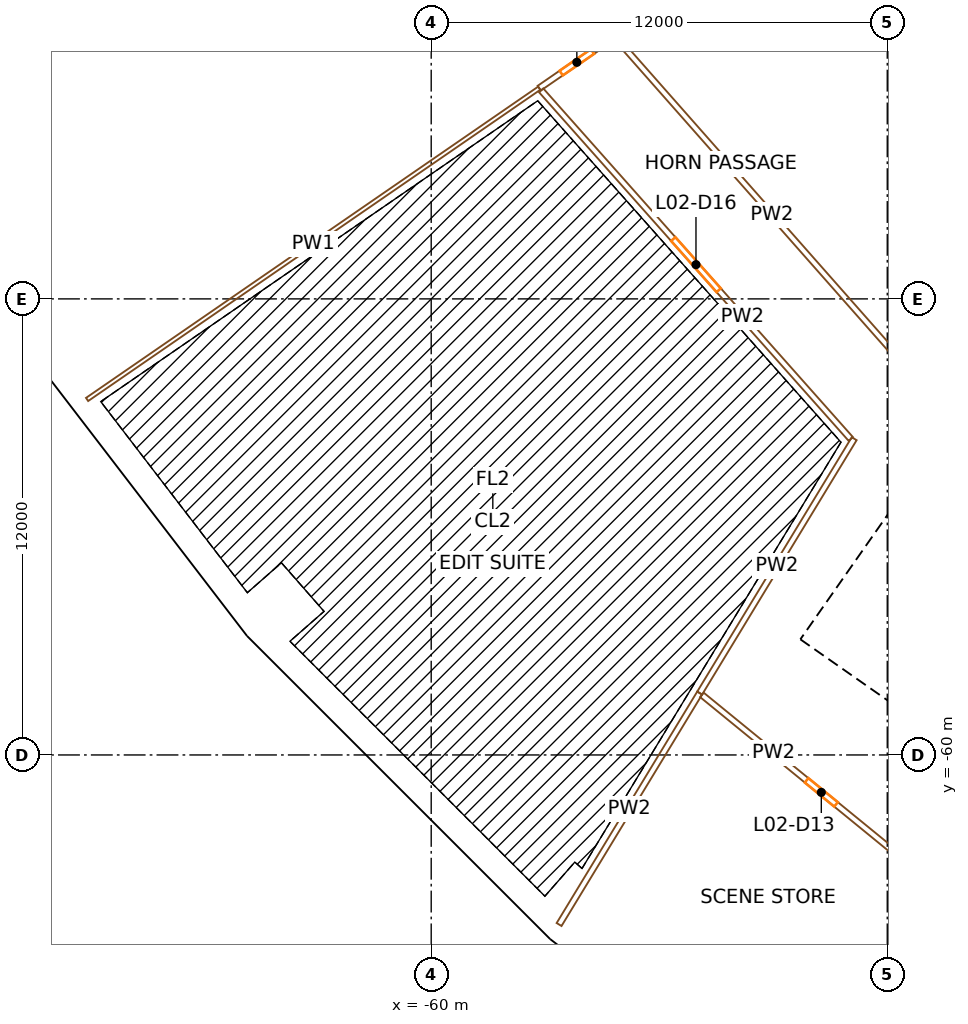
"""IFC4 building model, lengths in metres.
Left out: names, types, materials, properties, quantities, classifications, styles, units other than length and angle.
Written with IfcOpenShell. Run it as: python <this file> out.ifc"""

import sys

from ifc_helpers import new_model, si_unit, direction, frame, frame_2d, origin, origin_2d, place, context, subcontext, project, spatial, rectangle, extrude, element, fill, save


model = new_model("IFC4")
c1 = context("Model", 3, precision=1e-05, world=origin(), true_north=direction((0.0, 1.0)))
c2 = subcontext(c1, "Body", "Model", "MODEL_VIEW")
j1 = project(units=[si_unit("LENGTHUNIT", "METRE"), si_unit("PLANEANGLEUNIT", "RADIAN")], contexts=[c1])
p1 = place(None, origin())
s1 = spatial("IfcSite", under=j1, at=p1, CompositionType="ELEMENT")
p2 = place(p1, origin())
s2 = spatial("IfcBuilding", under=s1, at=p2, CompositionType="ELEMENT")
p3 = place(p2, frame((0.0, 0.0, 18.0)))
s3 = spatial("IfcBuildingStorey", under=s2, at=p3, CompositionType="ELEMENT", Elevation=18.0)
for number, where, z_axis, x_axis in (
    (1, (-64.647, -43.196, 0.0), (0.0, 0.0, 1.0), (0.556, -0.831, 0.0)),
    (2, (-58.456, -51.264, 0.0), (0.0, 0.0, 1.0), (0.659, -0.752, 0.0)),
):
    element("IfcColumn", number, at=place(p3, frame(where, z_axis=z_axis, x_axis=x_axis)), inside=s3, PredefinedType="COLUMN", context=c2, shape_type="SweptSolid", body=[
        extrude(rectangle(XDim=1.4, YDim=1.8, at=origin_2d()), origin(), (0.0, 0.0, 1.0), 9.0),
    ])
p4 = place(p3, frame((-64.094, -56.209, 0.0), z_axis=(0.0, 0.0, 1.0), x_axis=(0.6593458151, -0.751839807479, 0.0)))
e3 = element("IfcColumn", 3, at=p4, inside=s3, PredefinedType="COLUMN", context=c2, shape_type="SweptSolid", body=[
    extrude(rectangle(XDim=1.1, YDim=1.3, at=origin_2d()), origin(), (0.0, 0.0, 1.0), 9.0),
])
p5 = place(p3, frame((-51.264, -58.456, 0.0), z_axis=(0.0, 0.0, 1.0), x_axis=(0.751839807479, -0.6593458151, 0.0)))
e4 = element("IfcColumn", 4, at=p5, inside=s3, PredefinedType="COLUMN", context=c2, shape_type="SweptSolid", body=[
    extrude(rectangle(XDim=1.4, YDim=1.8, at=origin_2d()), origin(), (0.0, 0.0, 1.0), 9.0),
])
p6 = place(p3, frame((-56.209, -64.094, 0.0), z_axis=(0.0, 0.0, 1.0), x_axis=(0.751839807479, -0.6593458151, 0.0)))
e5 = element("IfcColumn", 5, at=p6, inside=s3, PredefinedType="COLUMN", context=c2, shape_type="SweptSolid", body=[
    extrude(rectangle(XDim=1.1, YDim=1.3, at=origin_2d()), origin(), (0.0, 0.0, 1.0), 9.0),
])
p7 = place(p3, frame((-49.779, -57.191, 0.0), z_axis=(0.0, 0.0, 1.0), x_axis=(0.573577477574, 0.819151315216, 0.0)))
e6 = element("IfcWall", 6, at=p7, inside=s3, PredefinedType="SHEAR", context=c2, shape_type="SweptSolid", body=[
    extrude(rectangle(XDim=14.8, YDim=0.9, at=frame_2d((7.4, 0.0))), origin(), (0.0, 0.0, 1.0), 8.6),
])
p8 = place(p7, frame((6.7, 0.0, 0.0)))
e7 = element("IfcOpeningElement", 7, at=p8, cuts=e6, PredefinedType="OPENING", context=c2, shape_type="SweptSolid", body=[
    extrude(rectangle(XDim=1.4, YDim=2.1, at=frame_2d((0.7, 1.05))), frame((0.0, 0.46, 0.0), z_axis=(0.0, -1.0, 0.0), x_axis=(1.0, 0.0, 0.0)), (0.0, 0.0, 1.0), 0.92),
])
p9 = place(p3, frame((-36.827, -65.71, 0.0), z_axis=(0.0, 0.0, 1.0), x_axis=(-0.819153391756, 0.573574511963, 0.0)))
e8 = element("IfcWall", 8, at=p9, inside=s3, PredefinedType="SHEAR", context=c2, shape_type="SweptSolid", body=[
    extrude(rectangle(XDim=15.045, YDim=0.9, at=frame_2d((7.523, 0.0))), origin(), (0.0, 0.0, 1.0), 8.6),
])
p10 = place(p9, frame((1.05, 0.0, 0.0)))
e9 = element("IfcOpeningElement", 9, at=p10, cuts=e8, PredefinedType="OPENING", context=c2, shape_type="SweptSolid", body=[
    extrude(rectangle(XDim=1.0, YDim=2.1, at=frame_2d((0.5, 1.05))), frame((0.0, 0.46, 0.0), z_axis=(0.0, -1.0, 0.0), x_axis=(1.0, 0.0, 0.0)), (0.0, 0.0, 1.0), 0.92),
])
p11 = place(p9, frame((3.625, 0.0, 0.0)))
e10 = element("IfcOpeningElement", 10, at=p11, cuts=e8, PredefinedType="OPENING", context=c2, shape_type="SweptSolid", body=[
    extrude(rectangle(XDim=1.0, YDim=2.1, at=frame_2d((0.5, 1.05))), frame((0.0, 0.46, 0.0), z_axis=(0.0, -1.0, 0.0), x_axis=(1.0, 0.0, 0.0)), (0.0, 0.0, 1.0), 0.92),
])
p12 = place(p9, frame((6.075, 0.0, 0.0)))
e11 = element("IfcOpeningElement", 11, at=p12, cuts=e8, PredefinedType="OPENING", context=c2, shape_type="SweptSolid", body=[
    extrude(rectangle(XDim=1.0, YDim=2.1, at=frame_2d((0.5, 1.05))), frame((0.0, 0.46, 0.0), z_axis=(0.0, -1.0, 0.0), x_axis=(1.0, 0.0, 0.0)), (0.0, 0.0, 1.0), 0.92),
])
p13 = place(p9, frame((13.495, 0.0, 0.0)))
e12 = element("IfcOpeningElement", 12, at=p13, cuts=e8, PredefinedType="OPENING", context=c2, shape_type="SweptSolid", body=[
    extrude(rectangle(XDim=1.1, YDim=2.1, at=frame_2d((0.55, 1.05))), frame((0.0, 0.46, 0.0), z_axis=(0.0, -1.0, 0.0), x_axis=(1.0, 0.0, 0.0)), (0.0, 0.0, 1.0), 0.92),
])
p14 = place(p3, frame((-71.491, -47.839, 0.0), z_axis=(0.0, 0.0, 1.0), x_axis=(0.608758773695, -0.793355377778, 0.0)))
e13 = element("IfcWall", 13, at=p14, inside=s3, PredefinedType="SOLIDWALL", context=c2, shape_type="SweptSolid", body=[
    extrude(rectangle(XDim=11.135, YDim=0.45, at=frame_2d((5.567, 0.0))), origin(), (0.0, 0.0, 1.0), 7.7),
])
p15 = place(p3, frame((-64.698, -56.699, 0.0), z_axis=(0.0, 0.0, 1.0), x_axis=(0.707106781187, -0.707106781187, 0.0)))
e14 = element("IfcWall", 14, at=p15, inside=s3, PredefinedType="SOLIDWALL", context=c2, shape_type="SweptSolid", body=[
    extrude(rectangle(XDim=11.312, YDim=0.45, at=frame_2d((5.656, 0.0))), origin(), (0.0, 0.0, 1.0), 7.7),
])
p16 = place(p3, frame((-56.673, -64.713, 0.0), z_axis=(0.0, 0.0, 1.0), x_axis=(0.793355377778, -0.608758773695, 0.0)))
e15 = element("IfcWall", 15, at=p16, inside=s3, PredefinedType="SOLIDWALL", context=c2, shape_type="SweptSolid", body=[
    extrude(rectangle(XDim=11.135, YDim=0.45, at=frame_2d((5.567, 0.0))), origin(), (0.0, 0.0, 1.0), 7.7),
])
p17 = place(p3, frame((-69.054, -50.646, 0.0), z_axis=(0.0, 0.0, 1.0), x_axis=(0.823691111389, 0.567038757952, 0.0)))
e16 = element("IfcWall", 16, at=p17, inside=s3, PredefinedType="PARTITIONING", context=c2, shape_type="SweptSolid", body=[
    extrude(rectangle(XDim=14.444, YDim=0.1, at=frame_2d((7.222, 0.0))), origin(), (0.0, 0.0, 1.0), 7.6),
])
p18 = place(p3, frame((-57.157, -42.456, 0.0), z_axis=(0.0, 0.0, 1.0), x_axis=(0.823667994332, 0.567072336755, 0.0)))
e17 = element("IfcWall", 17, at=p18, inside=s3, PredefinedType="PARTITIONING", context=c2, shape_type="SweptSolid", body=[
    extrude(rectangle(XDim=2.401, YDim=0.15, at=frame_2d((1.201, 0.0))), origin(), (0.0, 0.0, 1.0), 7.6),
])
p19 = place(p18, frame((0.701, 0.0, 0.0)))
e18 = element("IfcOpeningElement", 18, at=p19, cuts=e17, PredefinedType="OPENING", context=c2, shape_type="SweptSolid", body=[
    extrude(rectangle(XDim=1.0, YDim=2.1, at=frame_2d((0.5, 1.05))), frame((0.0, 0.085, 0.0), z_axis=(0.0, -1.0, 0.0), x_axis=(1.0, 0.0, 0.0)), (0.0, 0.0, 1.0), 0.17),
])
p20 = place(p3, frame((-52.936, -58.372, 0.0), z_axis=(0.0, 0.0, 1.0), x_axis=(-0.519148894699, -0.854683815883, 0.0)))
e19 = element("IfcWall", 19, at=p20, inside=s3, PredefinedType="PARTITIONING", context=c2, shape_type="SweptSolid", body=[
    extrude(rectangle(XDim=7.125, YDim=0.15, at=frame_2d((3.563, 0.0))), origin(), (0.0, 0.0, 1.0), 7.6),
])
p21 = place(p3, frame((-46.594, -63.549, 0.0), z_axis=(0.0, 0.0, 1.0), x_axis=(-0.774664810718, 0.632372066931, 0.0)))
e20 = element("IfcWall", 20, at=p21, inside=s3, PredefinedType="PARTITIONING", context=c2, shape_type="SweptSolid", body=[
    extrude(rectangle(XDim=8.112, YDim=0.15, at=frame_2d((4.056, 0.0))), origin(), (0.0, 0.0, 1.0), 7.6),
])
p22 = place(p21, frame((3.556, 0.0, 0.0)))
e21 = element("IfcOpeningElement", 21, at=p22, cuts=e20, PredefinedType="OPENING", context=c2, shape_type="SweptSolid", body=[
    extrude(rectangle(XDim=1.0, YDim=2.1, at=frame_2d((0.5, 1.05))), frame((0.0, 0.085, 0.0), z_axis=(0.0, -1.0, 0.0), x_axis=(1.0, 0.0, 0.0)), (0.0, 0.0, 1.0), 0.17),
])
p23 = place(p3, frame((-50.635, -69.062, 0.0), z_axis=(0.0, 0.0, 1.0), x_axis=(0.591296194805, 0.806454468652, 0.0)))
e22 = element("IfcWall", 22, at=p23, inside=s3, PredefinedType="PARTITIONING", context=c2, shape_type="SweptSolid", body=[
    extrude(rectangle(XDim=6.746, YDim=0.18, at=frame_2d((3.373, 0.0))), origin(), (0.0, 0.0, 1.0), 7.6),
])
p24 = place(p3, frame((-48.959, -51.687, 0.0), z_axis=(0.0, 0.0, 1.0), x_axis=(-0.664036516543, 0.747700143572, 0.0)))
e23 = element("IfcWall", 23, at=p24, inside=s3, PredefinedType="PARTITIONING", context=c2, shape_type="SweptSolid", body=[
    extrude(rectangle(XDim=12.271, YDim=0.15, at=frame_2d((6.135, 0.0))), origin(), (0.0, 0.0, 1.0), 7.6),
])
p25 = place(p24, frame((5.235, 0.0, 0.0)))
e24 = element("IfcOpeningElement", 24, at=p25, cuts=e23, PredefinedType="OPENING", context=c2, shape_type="SweptSolid", body=[
    extrude(rectangle(XDim=1.8, YDim=2.1, at=frame_2d((0.9, 1.05))), frame((0.0, 0.085, 0.0), z_axis=(0.0, -1.0, 0.0), x_axis=(1.0, 0.0, 0.0)), (0.0, 0.0, 1.0), 0.17),
])
p26 = place(p3, frame((-48.87, -51.679, 0.0), z_axis=(0.0, 0.0, 1.0), x_axis=(-0.519169312849, -0.854671413232, 0.0)))
e25 = element("IfcWall", 25, at=p26, inside=s3, PredefinedType="PARTITIONING", context=c2, shape_type="SweptSolid", body=[
    extrude(rectangle(XDim=7.831, YDim=0.15, at=frame_2d((3.915, 0.0))), origin(), (0.0, 0.0, 1.0), 7.6),
])
p27 = place(p3, frame((-47.683, -49.587, 0.0), z_axis=(0.0, 0.0, 1.0), x_axis=(-0.661713482334, 0.749756805436, 0.0)))
e26 = element("IfcWall", 26, at=p27, inside=s3, PredefinedType="PARTITIONING", context=c2, shape_type="SweptSolid", body=[
    extrude(rectangle(XDim=11.253, YDim=0.15, at=frame_2d((5.626, 0.0))), origin(), (0.0, 0.0, 1.0), 7.6),
])
p28 = place(p13, origin())
e27 = element("IfcDoor", 27, at=p28, inside=s3, OperationType="SINGLE_SWING_LEFT", PredefinedType="DOOR", context=c2, shape_type="SweptSolid", body=[
    extrude(rectangle(XDim=1.1, YDim=2.1, at=frame_2d((0.55, 1.05))), frame((0.0, 0.025, 0.0), z_axis=(0.0, -1.0, 0.0), x_axis=(1.0, 0.0, 0.0)), (0.0, 0.0, 1.0), 0.05),
])
fill(e12, e27)
p29 = place(p22, origin())
e28 = element("IfcDoor", 28, at=p29, inside=s3, OperationType="SINGLE_SWING_RIGHT", PredefinedType="DOOR", context=c2, shape_type="SweptSolid", body=[
    extrude(rectangle(XDim=1.0, YDim=2.1, at=frame_2d((0.5, 1.05))), frame((0.0, 0.025, 0.0), z_axis=(0.0, -1.0, 0.0), x_axis=(1.0, 0.0, 0.0)), (0.0, 0.0, 1.0), 0.05),
])
fill(e21, e28)
p30 = place(p25, origin())
e29 = element("IfcDoor", 29, at=p30, inside=s3, OperationType="DOUBLE_DOOR_SINGLE_SWING", PredefinedType="DOOR", context=c2, shape_type="SweptSolid", body=[
    extrude(rectangle(XDim=1.8, YDim=2.1, at=frame_2d((0.9, 1.05))), frame((0.0, 0.025, 0.0), z_axis=(0.0, -1.0, 0.0), x_axis=(1.0, 0.0, 0.0)), (0.0, 0.0, 1.0), 0.05),
])
fill(e24, e29)
p31 = place(p19, origin())
e30 = element("IfcDoor", 30, at=p31, inside=s3, OperationType="SINGLE_SWING_RIGHT", PredefinedType="DOOR", context=c2, shape_type="SweptSolid", body=[
    extrude(rectangle(XDim=1.0, YDim=2.1, at=frame_2d((0.5, 1.05))), frame((0.0, 0.025, 0.0), z_axis=(0.0, -1.0, 0.0), x_axis=(1.0, 0.0, 0.0)), (0.0, 0.0, 1.0), 0.05),
])
fill(e18, e30)
save(model, sys.argv[1])
